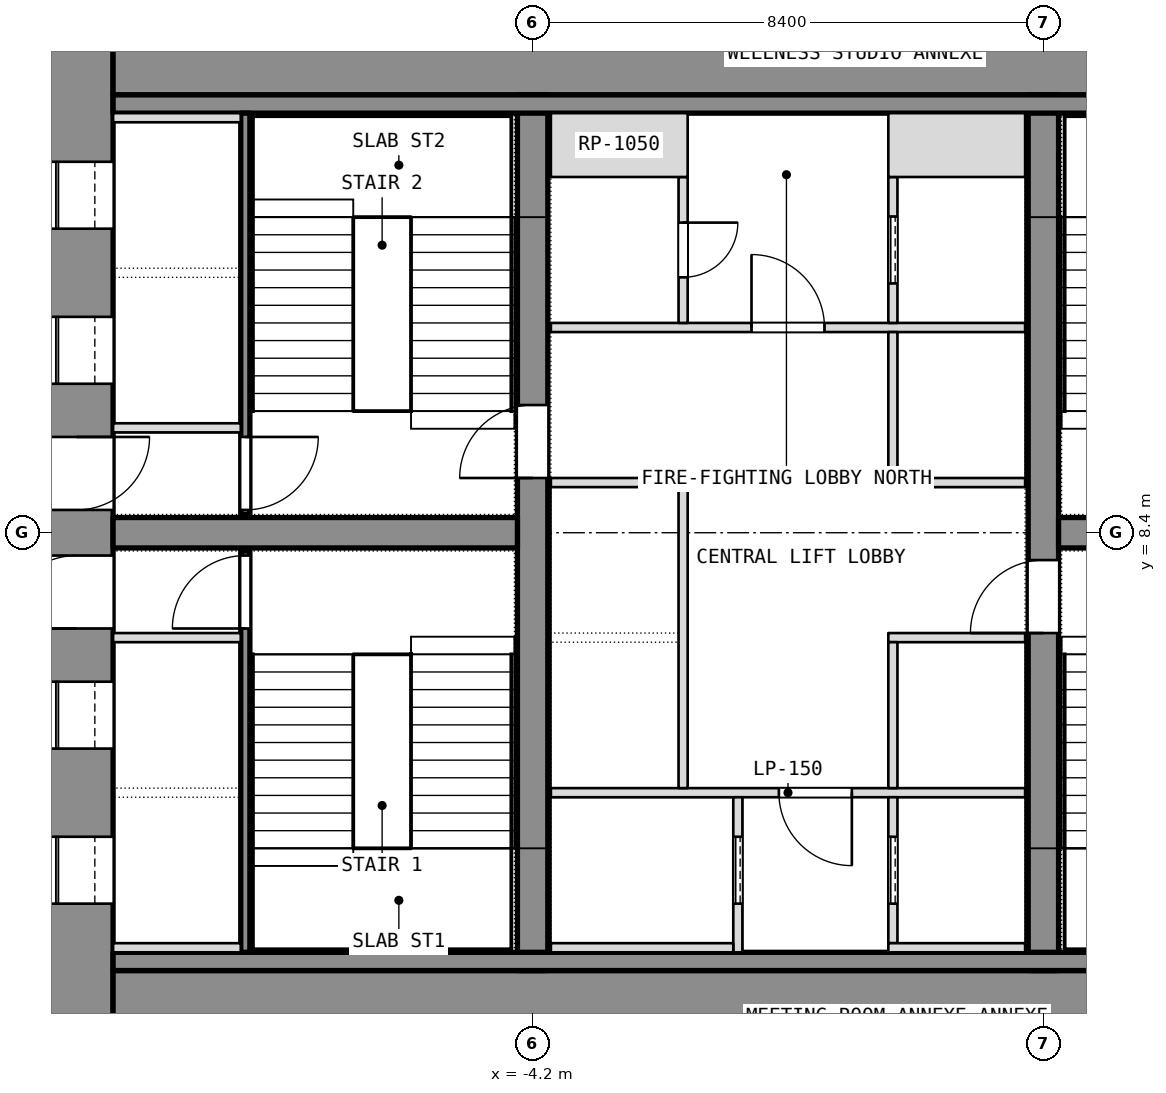
"""IFC4 building model, lengths in metres.
Left out: names, types, materials, properties, quantities, classifications, styles, units other than length and angle.
Written with IfcOpenShell. Run it as: python <this file> out.ifc"""

import sys

from ifc_helpers import new_model, si_unit, direction, frame, frame_2d, origin, place, context, subcontext, project, spatial, rectangle, extrude, element, fill, save


model = new_model("IFC4")
c1 = context("Model", 3, precision=1e-05, world=origin(), true_north=direction((0.0, 1.0)))
c2 = subcontext(c1, "Body", "Model", "MODEL_VIEW")
j1 = project(units=[si_unit("LENGTHUNIT", "METRE"), si_unit("PLANEANGLEUNIT", "RADIAN")], contexts=[c1])
p1 = place(None, origin())
s1 = spatial("IfcSite", under=j1, at=p1, CompositionType="ELEMENT")
p2 = place(p1, origin())
s2 = spatial("IfcBuilding", under=s1, at=p2, CompositionType="ELEMENT")
p3 = place(p2, frame((0.0, 0.0, 65.3)))
s3 = spatial("IfcBuildingStorey", under=s2, at=p3, CompositionType="ELEMENT", Elevation=65.3)
p4 = place(p3, frame((-11.7, 0.0, 0.0), z_axis=(0.0, 0.0, 1.0), x_axis=(0.0, 1.0, 0.0)))
e1 = element("IfcWall", 1, at=p4, inside=s3, PredefinedType="SHEAR", context=c2, shape_type="SweptSolid", body=[
    extrude(rectangle(XDim=16.8, YDim=1.2, at=frame_2d((8.4, 0.0))), origin(), (0.0, 0.0, 1.0), 3.6),
])
p5 = place(p4, frame((2.3, 0.0, 0.0)))
e2 = element("IfcOpeningElement", 2, at=p5, cuts=e1, PredefinedType="OPENING", context=c2, shape_type="SweptSolid", body=[
    extrude(rectangle(XDim=1.1, YDim=2.1, at=frame_2d((0.55, 1.05))), frame((0.0, 0.6, 0.0), z_axis=(0.0, -1.0, 0.0), x_axis=(1.0, 0.0, 0.0)), (0.0, 0.0, 1.0), 1.2),
])
p6 = place(p4, frame((4.85, 0.0, 0.0)))
e3 = element("IfcOpeningElement", 3, at=p6, cuts=e1, PredefinedType="OPENING", context=c2, shape_type="SweptSolid", body=[
    extrude(rectangle(XDim=1.1, YDim=2.1, at=frame_2d((0.55, 1.05))), frame((0.0, 0.6, 0.0), z_axis=(0.0, -1.0, 0.0), x_axis=(1.0, 0.0, 0.0)), (0.0, 0.0, 1.0), 1.2),
])
p7 = place(p4, frame((6.825, 0.0, 0.0)))
e4 = element("IfcOpeningElement", 4, at=p7, cuts=e1, PredefinedType="OPENING", context=c2, shape_type="SweptSolid", body=[
    extrude(rectangle(XDim=1.2, YDim=2.1, at=frame_2d((0.6, 1.05))), frame((0.0, 0.6, 0.0), z_axis=(0.0, -1.0, 0.0), x_axis=(1.0, 0.0, 0.0)), (0.0, 0.0, 1.0), 1.2),
])
p8 = place(p4, frame((13.4, 0.0, 0.0)))
e5 = element("IfcOpeningElement", 5, at=p8, cuts=e1, PredefinedType="OPENING", context=c2, shape_type="SweptSolid", body=[
    extrude(rectangle(XDim=1.1, YDim=2.1, at=frame_2d((0.55, 1.05))), frame((0.0, 0.6, 0.0), z_axis=(0.0, -1.0, 0.0), x_axis=(1.0, 0.0, 0.0)), (0.0, 0.0, 1.0), 1.2),
])
p9 = place(p4, frame((10.85, 0.0, 0.0)))
e6 = element("IfcOpeningElement", 6, at=p9, cuts=e1, PredefinedType="OPENING", context=c2, shape_type="SweptSolid", body=[
    extrude(rectangle(XDim=1.1, YDim=2.1, at=frame_2d((0.55, 1.05))), frame((0.0, 0.6, 0.0), z_axis=(0.0, -1.0, 0.0), x_axis=(1.0, 0.0, 0.0)), (0.0, 0.0, 1.0), 1.2),
])
p10 = place(p4, frame((8.775, 0.0, 0.0)))
e7 = element("IfcOpeningElement", 7, at=p10, cuts=e1, PredefinedType="OPENING", context=c2, shape_type="SweptSolid", body=[
    extrude(rectangle(XDim=1.2, YDim=2.1, at=frame_2d((0.6, 1.05))), frame((0.0, 0.6, 0.0), z_axis=(0.0, -1.0, 0.0), x_axis=(1.0, 0.0, 0.0)), (0.0, 0.0, 1.0), 1.2),
])
for number, where, z_axis, x_axis in (
    (8, (-11.1, 0.6, 0.0), (0.0, 0.0, 1.0), (1.0, 0.0, 0.0)),
    (9, (-11.1, 16.2, 0.0), (0.0, 0.0, 1.0), (1.0, 0.0, 0.0)),
):
    element("IfcWall", number, at=place(p3, frame(where, z_axis=z_axis, x_axis=x_axis)), inside=s3, PredefinedType="SHEAR", context=c2, shape_type="SweptSolid", body=[
        extrude(rectangle(XDim=22.2, YDim=1.2, at=frame_2d((11.1, 0.0))), origin(), (0.0, 0.0, 1.0), 3.6),
    ])
p11 = place(p3, frame((-4.2, 1.2, 0.0), z_axis=(0.0, 0.0, 1.0), x_axis=(0.0, 1.0, 0.0)))
e10 = element("IfcWall", 10, at=p11, inside=s3, PredefinedType="SHEAR", context=c2, shape_type="SweptSolid", body=[
    extrude(rectangle(XDim=14.4, YDim=0.5, at=frame_2d((7.2, 0.0))), origin(), (0.0, 0.0, 1.0), 3.6),
])
p12 = place(p11, frame((8.1, 0.0, 0.0)))
e11 = element("IfcOpeningElement", 11, at=p12, cuts=e10, PredefinedType="OPENING", context=c2, shape_type="SweptSolid", body=[
    extrude(rectangle(XDim=1.2, YDim=2.1, at=frame_2d((0.6, 1.05))), frame((0.0, 0.25, 0.0), z_axis=(0.0, -1.0, 0.0), x_axis=(1.0, 0.0, 0.0)), (0.0, 0.0, 1.0), 0.5),
])
p13 = place(p3, frame((4.2, 1.2, 0.0), z_axis=(0.0, 0.0, 1.0), x_axis=(0.0, 1.0, 0.0)))
e12 = element("IfcWall", 12, at=p13, inside=s3, PredefinedType="SHEAR", context=c2, shape_type="SweptSolid", body=[
    extrude(rectangle(XDim=14.4, YDim=0.5, at=frame_2d((7.2, 0.0))), origin(), (0.0, 0.0, 1.0), 3.6),
])
p14 = place(p13, frame((5.55, 0.0, 0.0)))
e13 = element("IfcOpeningElement", 13, at=p14, cuts=e12, PredefinedType="OPENING", context=c2, shape_type="SweptSolid", body=[
    extrude(rectangle(XDim=1.2, YDim=2.1, at=frame_2d((0.6, 1.05))), frame((0.0, 0.25, 0.0), z_axis=(0.0, -1.0, 0.0), x_axis=(1.0, 0.0, 0.0)), (0.0, 0.0, 1.0), 0.5),
])
for number, where, z_axis, x_axis in (
    (14, (-11.1, 8.4, 0.0), (0.0, 0.0, 1.0), (1.0, 0.0, 0.0)),
    (15, (4.45, 8.4, 0.0), (0.0, 0.0, 1.0), (1.0, 0.0, 0.0)),
):
    element("IfcWall", number, at=place(p3, frame(where, z_axis=z_axis, x_axis=x_axis)), inside=s3, PredefinedType="SHEAR", context=c2, shape_type="SweptSolid", body=[
        extrude(rectangle(XDim=6.65, YDim=0.5, at=frame_2d((3.325, 0.0))), origin(), (0.0, 0.0, 1.0), 3.6),
    ])
for number, where, z_axis, x_axis in (
    (16, (-11.1, 1.35, 0.0), (0.0, 0.0, 1.0), (1.0, 0.0, 0.0)),
    (17, (-11.1, 15.45, 0.0), (0.0, 0.0, 1.0), (1.0, 0.0, 0.0)),
):
    element("IfcWall", number, at=place(p3, frame(where, z_axis=z_axis, x_axis=x_axis)), inside=s3, PredefinedType="PARTITIONING", context=c2, shape_type="SweptSolid", body=[
        extrude(rectangle(XDim=22.2, YDim=0.3, at=frame_2d((11.1, 0.0))), origin(), (0.0, 0.0, 1.0), 3.34),
    ])
p15 = place(p3, frame((-8.925, 1.5, 0.0), z_axis=(0.0, 0.0, 1.0), x_axis=(0.0, 1.0, 0.0)))
e18 = element("IfcWall", 18, at=p15, inside=s3, PredefinedType="SHEAR", context=c2, shape_type="SweptSolid", body=[
    extrude(rectangle(XDim=6.6, YDim=0.15, at=frame_2d((3.3, 0.0))), origin(), (0.0, 0.0, 1.0), 3.34),
])
p16 = place(p15, frame((5.325, 0.0, 0.0)))
e19 = element("IfcOpeningElement", 19, at=p16, cuts=e18, PredefinedType="OPENING", context=c2, shape_type="SweptSolid", body=[
    extrude(rectangle(XDim=1.2, YDim=2.1, at=frame_2d((0.6, 1.05))), frame((0.0, 0.075, 0.0), z_axis=(0.0, -1.0, 0.0), x_axis=(1.0, 0.0, 0.0)), (0.0, 0.0, 1.0), 0.15),
])
for number, where, z_axis, x_axis in (
    (20, (-11.1, 6.675, 0.0), (0.0, 0.0, 1.0), (1.0, 0.0, 0.0)),
    (21, (-11.1, 1.575, 0.0), (0.0, 0.0, 1.0), (1.0, 0.0, 0.0)),
):
    element("IfcWall", number, at=place(p3, frame(where, z_axis=z_axis, x_axis=x_axis)), inside=s3, PredefinedType="SHEAR", context=c2, shape_type="SweptSolid", body=[
        extrude(rectangle(XDim=2.1, YDim=0.15, at=frame_2d((1.05, 0.0))), origin(), (0.0, 0.0, 1.0), 3.6),
    ])
p17 = place(p3, frame((-8.925, 8.7, 0.0), z_axis=(0.0, 0.0, 1.0), x_axis=(0.0, 1.0, 0.0)))
e22 = element("IfcWall", 22, at=p17, inside=s3, PredefinedType="SHEAR", context=c2, shape_type="SweptSolid", body=[
    extrude(rectangle(XDim=6.6, YDim=0.15, at=frame_2d((3.3, 0.0))), origin(), (0.0, 0.0, 1.0), 3.34),
])
p18 = place(p17, frame((0.075, 0.0, 0.0)))
e23 = element("IfcOpeningElement", 23, at=p18, cuts=e22, PredefinedType="OPENING", context=c2, shape_type="SweptSolid", body=[
    extrude(rectangle(XDim=1.2, YDim=2.1, at=frame_2d((0.6, 1.05))), frame((0.0, 0.075, 0.0), z_axis=(0.0, -1.0, 0.0), x_axis=(1.0, 0.0, 0.0)), (0.0, 0.0, 1.0), 0.15),
])
for number, where, z_axis, x_axis in (
    (24, (-11.1, 10.125, 0.0), (0.0, 0.0, 1.0), (1.0, 0.0, 0.0)),
    (25, (-11.1, 15.225, 0.0), (0.0, 0.0, 1.0), (1.0, 0.0, 0.0)),
):
    element("IfcWall", number, at=place(p3, frame(where, z_axis=z_axis, x_axis=x_axis)), inside=s3, PredefinedType="SHEAR", context=c2, shape_type="SweptSolid", body=[
        extrude(rectangle(XDim=2.1, YDim=0.15, at=frame_2d((1.05, 0.0))), origin(), (0.0, 0.0, 1.0), 3.6),
    ])
p19 = place(p3, frame((-3.9, 4.125, 0.0), z_axis=(0.0, 0.0, 1.0), x_axis=(1.0, 0.0, 0.0)))
e26 = element("IfcWall", 26, at=p19, inside=s3, PredefinedType="PARTITIONING", context=c2, shape_type="SweptSolid", body=[
    extrude(rectangle(XDim=7.8, YDim=0.15, at=frame_2d((3.9, 0.0))), origin(), (0.0, 0.0, 1.0), 3.34),
])
p20 = place(p19, frame((3.75, 0.0, 0.0)))
e27 = element("IfcOpeningElement", 27, at=p20, cuts=e26, PredefinedType="OPENING", context=c2, shape_type="SweptSolid", body=[
    extrude(rectangle(XDim=1.2, YDim=2.1, at=frame_2d((0.6, 1.05))), frame((0.0, 0.075, 0.0), z_axis=(0.0, -1.0, 0.0), x_axis=(1.0, 0.0, 0.0)), (0.0, 0.0, 1.0), 0.15),
])
p21 = place(p3, frame((-3.9, 11.775, 0.0), z_axis=(0.0, 0.0, 1.0), x_axis=(1.0, 0.0, 0.0)))
e28 = element("IfcWall", 28, at=p21, inside=s3, PredefinedType="PARTITIONING", context=c2, shape_type="SweptSolid", body=[
    extrude(rectangle(XDim=7.8, YDim=0.15, at=frame_2d((3.9, 0.0))), origin(), (0.0, 0.0, 1.0), 3.34),
])
p22 = place(p21, frame((3.3, 0.0, 0.0)))
e29 = element("IfcOpeningElement", 29, at=p22, cuts=e28, PredefinedType="OPENING", context=c2, shape_type="SweptSolid", body=[
    extrude(rectangle(XDim=1.2, YDim=2.1, at=frame_2d((0.6, 1.05))), frame((0.0, 0.075, 0.0), z_axis=(0.0, -1.0, 0.0), x_axis=(1.0, 0.0, 0.0)), (0.0, 0.0, 1.0), 0.15),
])
p23 = place(p3, frame((-0.825, 1.5, 0.0), z_axis=(0.0, 0.0, 1.0), x_axis=(0.0, 1.0, 0.0)))
e30 = element("IfcWall", 30, at=p23, inside=s3, PredefinedType="SHEAR", context=c2, shape_type="SweptSolid", body=[
    extrude(rectangle(XDim=2.55, YDim=0.15, at=frame_2d((1.275, 0.0))), origin(), (0.0, 0.0, 1.0), 3.6),
])
p24 = place(p23, frame((0.8, 0.0, 0.0)))
e31 = element("IfcOpeningElement", 31, at=p24, cuts=e30, PredefinedType="OPENING", context=c2, shape_type="SweptSolid", body=[
    extrude(rectangle(XDim=1.1, YDim=2.1, at=frame_2d((0.55, 1.05))), frame((0.0, 0.075, 0.0), z_axis=(0.0, -1.0, 0.0), x_axis=(1.0, 0.0, 0.0)), (0.0, 0.0, 1.0), 0.15),
])
p25 = place(p3, frame((-3.9, 1.575, 0.0), z_axis=(0.0, 0.0, 1.0), x_axis=(1.0, 0.0, 0.0)))
e32 = element("IfcWall", 32, at=p25, inside=s3, PredefinedType="SHEAR", context=c2, shape_type="SweptSolid", body=[
    extrude(rectangle(XDim=3.0, YDim=0.15, at=frame_2d((1.5, 0.0))), origin(), (0.0, 0.0, 1.0), 3.6),
])
p26 = place(p3, frame((-1.725, 4.2, 0.0), z_axis=(0.0, 0.0, 1.0), x_axis=(0.0, 1.0, 0.0)))
e33 = element("IfcWall", 33, at=p26, inside=s3, PredefinedType="SHEAR", context=c2, shape_type="SweptSolid", body=[
    extrude(rectangle(XDim=4.95, YDim=0.15, at=frame_2d((2.475, 0.0))), origin(), (0.0, 0.0, 1.0), 3.6),
])
p27 = place(p3, frame((-3.9, 9.225, 0.0), z_axis=(0.0, 0.0, 1.0), x_axis=(1.0, 0.0, 0.0)))
e34 = element("IfcWall", 34, at=p27, inside=s3, PredefinedType="SHEAR", context=c2, shape_type="SweptSolid", body=[
    extrude(rectangle(XDim=2.25, YDim=0.15, at=frame_2d((1.125, 0.0))), origin(), (0.0, 0.0, 1.0), 3.6),
])
p28 = place(p3, frame((-1.725, 11.85, 0.0), z_axis=(0.0, 0.0, 1.0), x_axis=(0.0, 1.0, 0.0)))
e35 = element("IfcWall", 35, at=p28, inside=s3, PredefinedType="PARTITIONING", context=c2, shape_type="SweptSolid", body=[
    extrude(rectangle(XDim=2.4, YDim=0.15, at=frame_2d((1.2, 0.0))), origin(), (0.0, 0.0, 1.0), 3.34),
])
p29 = place(p28, frame((0.75, 0.0, 0.0)))
e36 = element("IfcOpeningElement", 36, at=p29, cuts=e35, PredefinedType="OPENING", context=c2, shape_type="SweptSolid", body=[
    extrude(rectangle(XDim=0.9, YDim=2.1, at=frame_2d((0.45, 1.05))), frame((0.0, 0.075, 0.0), z_axis=(0.0, -1.0, 0.0), x_axis=(1.0, 0.0, 0.0)), (0.0, 0.0, 1.0), 0.15),
])
p30 = place(p3, frame((-3.9, 14.775, 0.0), z_axis=(0.0, 0.0, 1.0), x_axis=(1.0, 0.0, 0.0)))
e37 = element("IfcWall", 37, at=p30, inside=s3, PredefinedType="PARTITIONING", context=c2, shape_type="SweptSolid", body=[
    extrude(rectangle(XDim=2.25, YDim=1.05, at=frame_2d((1.125, 0.0))), origin(), (0.0, 0.0, 1.0), 3.34),
])
p31 = place(p3, frame((1.725, 1.65, 0.0), z_axis=(0.0, 0.0, 1.0), x_axis=(0.0, 1.0, 0.0)))
e38 = element("IfcWall", 38, at=p31, inside=s3, PredefinedType="SHEAR", context=c2, shape_type="SweptSolid", body=[
    extrude(rectangle(XDim=2.4, YDim=0.15, at=frame_2d((1.2, 0.0))), origin(), (0.0, 0.0, 1.0), 3.6),
])
p32 = place(p31, frame((0.65, 0.0, 0.0)))
e39 = element("IfcOpeningElement", 39, at=p32, cuts=e38, PredefinedType="OPENING", context=c2, shape_type="SweptSolid", body=[
    extrude(rectangle(XDim=1.1, YDim=2.1, at=frame_2d((0.55, 1.05))), frame((0.0, 0.075, 0.0), z_axis=(0.0, -1.0, 0.0), x_axis=(1.0, 0.0, 0.0)), (0.0, 0.0, 1.0), 0.15),
])
p33 = place(p3, frame((1.65, 1.575, 0.0), z_axis=(0.0, 0.0, 1.0), x_axis=(1.0, 0.0, 0.0)))
e40 = element("IfcWall", 40, at=p33, inside=s3, PredefinedType="SHEAR", context=c2, shape_type="SweptSolid", body=[
    extrude(rectangle(XDim=2.25, YDim=0.15, at=frame_2d((1.125, 0.0))), origin(), (0.0, 0.0, 1.0), 3.6),
])
p34 = place(p3, frame((1.725, 11.85, 0.0), z_axis=(0.0, 0.0, 1.0), x_axis=(0.0, 1.0, 0.0)))
e41 = element("IfcWall", 41, at=p34, inside=s3, PredefinedType="SHEAR", context=c2, shape_type="SweptSolid", body=[
    extrude(rectangle(XDim=2.4, YDim=0.15, at=frame_2d((1.2, 0.0))), origin(), (0.0, 0.0, 1.0), 3.6),
])
p35 = place(p34, frame((0.65, 0.0, 0.0)))
e42 = element("IfcOpeningElement", 42, at=p35, cuts=e41, PredefinedType="OPENING", context=c2, shape_type="SweptSolid", body=[
    extrude(rectangle(XDim=1.1, YDim=2.1, at=frame_2d((0.55, 1.05))), frame((0.0, 0.075, 0.0), z_axis=(0.0, -1.0, 0.0), x_axis=(1.0, 0.0, 0.0)), (0.0, 0.0, 1.0), 0.15),
])
p36 = place(p3, frame((1.65, 14.775, 0.0), z_axis=(0.0, 0.0, 1.0), x_axis=(1.0, 0.0, 0.0)))
e43 = element("IfcWall", 43, at=p36, inside=s3, PredefinedType="SHEAR", context=c2, shape_type="SweptSolid", body=[
    extrude(rectangle(XDim=2.25, YDim=1.05, at=frame_2d((1.125, 0.0))), origin(), (0.0, 0.0, 1.0), 3.6),
])
for number, where, z_axis, x_axis in (
    (44, (1.65, 6.675, 0.0), (0.0, 0.0, 1.0), (1.0, 0.0, 0.0)),
    (45, (1.65, 9.225, 0.0), (0.0, 0.0, 1.0), (1.0, 0.0, 0.0)),
):
    element("IfcWall", number, at=place(p3, frame(where, z_axis=z_axis, x_axis=x_axis)), inside=s3, PredefinedType="SHEAR", context=c2, shape_type="SweptSolid", body=[
        extrude(rectangle(XDim=2.25, YDim=0.15, at=frame_2d((1.125, 0.0))), origin(), (0.0, 0.0, 1.0), 3.6),
    ])
p37 = place(p3, frame((1.725, 4.2, 0.0), z_axis=(0.0, 0.0, 1.0), x_axis=(0.0, 1.0, 0.0)))
e46 = element("IfcWall", 46, at=p37, inside=s3, PredefinedType="SHEAR", context=c2, shape_type="SweptSolid", body=[
    extrude(rectangle(XDim=2.4, YDim=0.15, at=frame_2d((1.2, 0.0))), origin(), (0.0, 0.0, 1.0), 3.6),
])
p38 = place(p3, frame((1.725, 9.3, 0.0), z_axis=(0.0, 0.0, 1.0), x_axis=(0.0, 1.0, 0.0)))
e47 = element("IfcWall", 47, at=p38, inside=s3, PredefinedType="SHEAR", context=c2, shape_type="SweptSolid", body=[
    extrude(rectangle(XDim=2.4, YDim=0.15, at=frame_2d((1.2, 0.0))), origin(), (0.0, 0.0, 1.0), 3.6),
])
p39 = place(p5, origin())
e48 = element("IfcDoor", 48, at=p39, inside=s3, OperationType="SLIDING_TO_LEFT", PredefinedType="DOOR", context=c2, shape_type="SweptSolid", body=[
    extrude(rectangle(XDim=1.1, YDim=2.1, at=frame_2d((0.55, 1.05))), frame((0.0, 0.025, 0.0), z_axis=(0.0, -1.0, 0.0), x_axis=(1.0, 0.0, 0.0)), (0.0, 0.0, 1.0), 0.05),
])
fill(e2, e48)
p40 = place(p6, origin())
e49 = element("IfcDoor", 49, at=p40, inside=s3, OperationType="SLIDING_TO_LEFT", PredefinedType="DOOR", context=c2, shape_type="SweptSolid", body=[
    extrude(rectangle(XDim=1.1, YDim=2.1, at=frame_2d((0.55, 1.05))), frame((0.0, 0.025, 0.0), z_axis=(0.0, -1.0, 0.0), x_axis=(1.0, 0.0, 0.0)), (0.0, 0.0, 1.0), 0.05),
])
fill(e3, e49)
p41 = place(p7, origin())
e50 = element("IfcDoor", 50, at=p41, inside=s3, OperationType="SINGLE_SWING_LEFT", PredefinedType="DOOR", context=c2, shape_type="SweptSolid", body=[
    extrude(rectangle(XDim=1.2, YDim=2.1, at=frame_2d((0.6, 1.05))), frame((0.0, 0.025, 0.0), z_axis=(0.0, -1.0, 0.0), x_axis=(1.0, 0.0, 0.0)), (0.0, 0.0, 1.0), 0.05),
])
fill(e4, e50)
p42 = place(p16, origin())
e51 = element("IfcDoor", 51, at=p42, inside=s3, OperationType="SINGLE_SWING_LEFT", PredefinedType="DOOR", context=c2, shape_type="SweptSolid", body=[
    extrude(rectangle(XDim=1.2, YDim=2.1, at=frame_2d((0.6, 1.05))), frame((0.0, 0.025, 0.0), z_axis=(0.0, -1.0, 0.0), x_axis=(1.0, 0.0, 0.0)), (0.0, 0.0, 1.0), 0.05),
])
fill(e19, e51)
p43 = place(p8, origin())
e52 = element("IfcDoor", 52, at=p43, inside=s3, OperationType="SLIDING_TO_LEFT", PredefinedType="DOOR", context=c2, shape_type="SweptSolid", body=[
    extrude(rectangle(XDim=1.1, YDim=2.1, at=frame_2d((0.55, 1.05))), frame((0.0, 0.025, 0.0), z_axis=(0.0, -1.0, 0.0), x_axis=(1.0, 0.0, 0.0)), (0.0, 0.0, 1.0), 0.05),
])
fill(e5, e52)
p44 = place(p9, origin())
e53 = element("IfcDoor", 53, at=p44, inside=s3, OperationType="SLIDING_TO_LEFT", PredefinedType="DOOR", context=c2, shape_type="SweptSolid", body=[
    extrude(rectangle(XDim=1.1, YDim=2.1, at=frame_2d((0.55, 1.05))), frame((0.0, 0.025, 0.0), z_axis=(0.0, -1.0, 0.0), x_axis=(1.0, 0.0, 0.0)), (0.0, 0.0, 1.0), 0.05),
])
fill(e6, e53)
p45 = place(p10, origin())
e54 = element("IfcDoor", 54, at=p45, inside=s3, OperationType="SINGLE_SWING_LEFT", PredefinedType="DOOR", context=c2, shape_type="SweptSolid", body=[
    extrude(rectangle(XDim=1.2, YDim=2.1, at=frame_2d((0.6, 1.05))), frame((0.0, 0.025, 0.0), z_axis=(0.0, -1.0, 0.0), x_axis=(1.0, 0.0, 0.0)), (0.0, 0.0, 1.0), 0.05),
])
fill(e7, e54)
p46 = place(p18, origin())
e55 = element("IfcDoor", 55, at=p46, inside=s3, OperationType="SINGLE_SWING_LEFT", PredefinedType="DOOR", context=c2, shape_type="SweptSolid", body=[
    extrude(rectangle(XDim=1.2, YDim=2.1, at=frame_2d((0.6, 1.05))), frame((0.0, 0.025, 0.0), z_axis=(0.0, -1.0, 0.0), x_axis=(1.0, 0.0, 0.0)), (0.0, 0.0, 1.0), 0.05),
])
fill(e23, e55)
p47 = place(p24, origin())
e56 = element("IfcDoor", 56, at=p47, inside=s3, OperationType="SLIDING_TO_LEFT", PredefinedType="DOOR", context=c2, shape_type="SweptSolid", body=[
    extrude(rectangle(XDim=1.1, YDim=2.1, at=frame_2d((0.55, 1.05))), frame((0.0, 0.025, 0.0), z_axis=(0.0, -1.0, 0.0), x_axis=(1.0, 0.0, 0.0)), (0.0, 0.0, 1.0), 0.05),
])
fill(e31, e56)
p48 = place(p32, origin())
e57 = element("IfcDoor", 57, at=p48, inside=s3, OperationType="SLIDING_TO_LEFT", PredefinedType="DOOR", context=c2, shape_type="SweptSolid", body=[
    extrude(rectangle(XDim=1.1, YDim=2.1, at=frame_2d((0.55, 1.05))), frame((0.0, 0.025, 0.0), z_axis=(0.0, -1.0, 0.0), x_axis=(1.0, 0.0, 0.0)), (0.0, 0.0, 1.0), 0.05),
])
fill(e39, e57)
p49 = place(p35, origin())
e58 = element("IfcDoor", 58, at=p49, inside=s3, OperationType="SLIDING_TO_LEFT", PredefinedType="DOOR", context=c2, shape_type="SweptSolid", body=[
    extrude(rectangle(XDim=1.1, YDim=2.1, at=frame_2d((0.55, 1.05))), frame((0.0, 0.025, 0.0), z_axis=(0.0, -1.0, 0.0), x_axis=(1.0, 0.0, 0.0)), (0.0, 0.0, 1.0), 0.05),
])
fill(e42, e58)
p50 = place(p20, origin())
e59 = element("IfcDoor", 59, at=p50, inside=s3, OperationType="SINGLE_SWING_LEFT", PredefinedType="DOOR", context=c2, shape_type="SweptSolid", body=[
    extrude(rectangle(XDim=1.2, YDim=2.1, at=frame_2d((0.6, 1.05))), frame((0.0, 0.025, 0.0), z_axis=(0.0, -1.0, 0.0), x_axis=(1.0, 0.0, 0.0)), (0.0, 0.0, 1.0), 0.05),
])
fill(e27, e59)
p51 = place(p22, origin())
e60 = element("IfcDoor", 60, at=p51, inside=s3, OperationType="SINGLE_SWING_LEFT", PredefinedType="DOOR", context=c2, shape_type="SweptSolid", body=[
    extrude(rectangle(XDim=1.2, YDim=2.1, at=frame_2d((0.6, 1.05))), frame((0.0, 0.025, 0.0), z_axis=(0.0, -1.0, 0.0), x_axis=(1.0, 0.0, 0.0)), (0.0, 0.0, 1.0), 0.05),
])
fill(e29, e60)
p52 = place(p29, origin())
e61 = element("IfcDoor", 61, at=p52, inside=s3, OperationType="SINGLE_SWING_LEFT", PredefinedType="DOOR", context=c2, shape_type="SweptSolid", body=[
    extrude(rectangle(XDim=0.9, YDim=2.1, at=frame_2d((0.45, 1.05))), frame((0.0, 0.025, 0.0), z_axis=(0.0, -1.0, 0.0), x_axis=(1.0, 0.0, 0.0)), (0.0, 0.0, 1.0), 0.05),
])
fill(e36, e61)
p53 = place(p12, origin())
e62 = element("IfcDoor", 62, at=p53, inside=s3, OperationType="SINGLE_SWING_LEFT", PredefinedType="DOOR", context=c2, shape_type="SweptSolid", body=[
    extrude(rectangle(XDim=1.2, YDim=2.1, at=frame_2d((0.6, 1.05))), frame((0.0, 0.025, 0.0), z_axis=(0.0, -1.0, 0.0), x_axis=(1.0, 0.0, 0.0)), (0.0, 0.0, 1.0), 0.05),
])
fill(e11, e62)
p54 = place(p14, origin())
e63 = element("IfcDoor", 63, at=p54, inside=s3, OperationType="SINGLE_SWING_LEFT", PredefinedType="DOOR", context=c2, shape_type="SweptSolid", body=[
    extrude(rectangle(XDim=1.2, YDim=2.1, at=frame_2d((0.6, 1.05))), frame((0.0, 0.025, 0.0), z_axis=(0.0, -1.0, 0.0), x_axis=(1.0, 0.0, 0.0)), (0.0, 0.0, 1.0), 0.05),
])
fill(e13, e63)
save(model, sys.argv[1])
